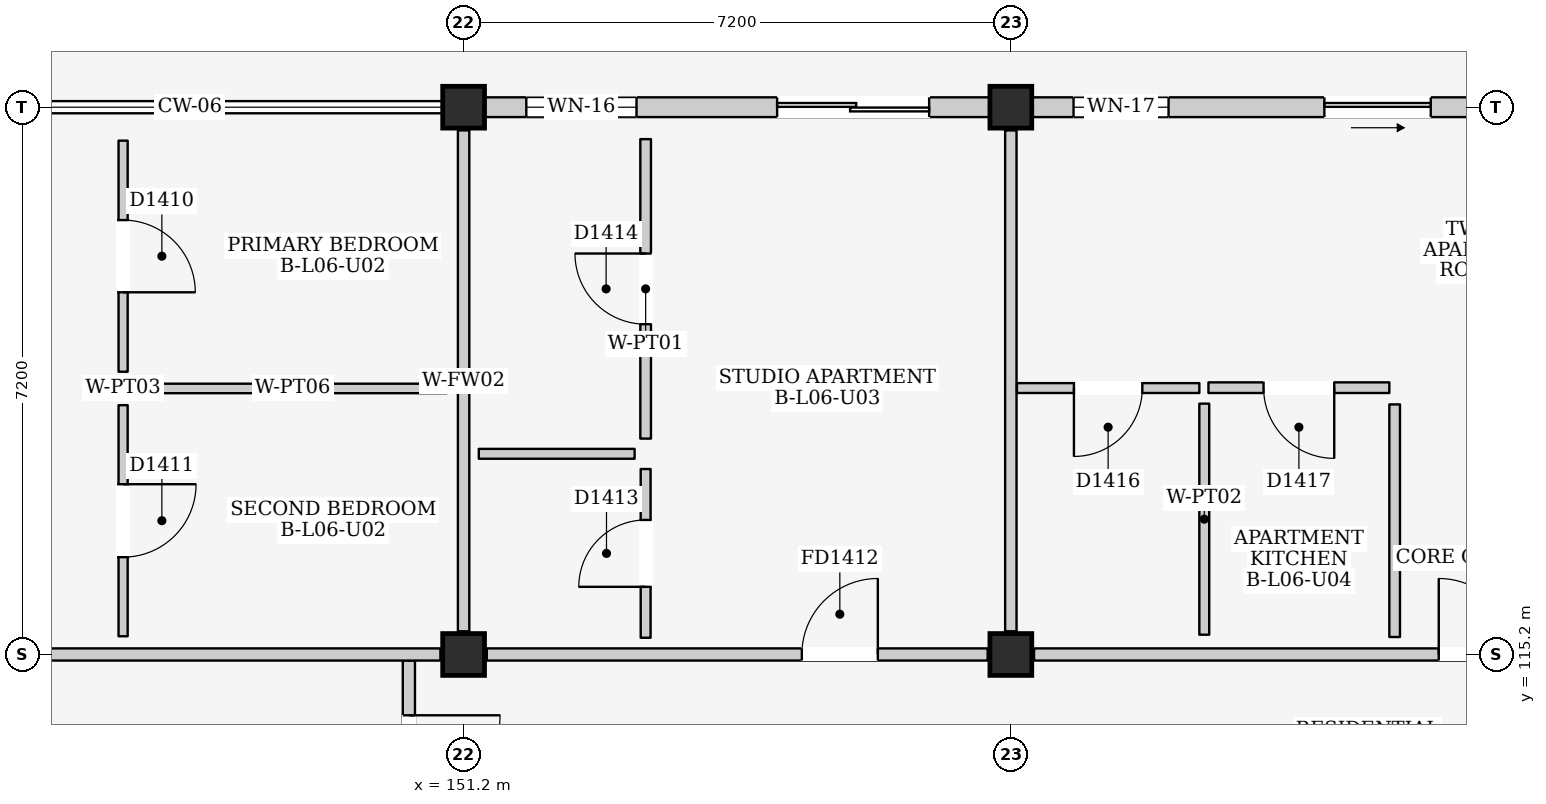
"""IFC4 building model, lengths in metres.
Left out: names, types, materials, properties, quantities, classifications, styles, units other than length and angle.
Written with IfcOpenShell. Run it as: python <this file> out.ifc"""

import sys

from ifc_helpers import new_model, si_unit, direction, frame, frame_2d, origin, origin_2d, place, context, subcontext, project, spatial, rectangle, extrude, element, fill, save


model = new_model("IFC4")
c1 = context("Model", 3, precision=1e-05, world=origin(), true_north=direction((0.0, 1.0)))
c2 = subcontext(c1, "Body", "Model", "MODEL_VIEW")
j1 = project(units=[si_unit("LENGTHUNIT", "METRE"), si_unit("PLANEANGLEUNIT", "RADIAN")], contexts=[c1])
p1 = place(None, origin())
s1 = spatial("IfcSite", under=j1, at=p1, CompositionType="ELEMENT")
p2 = place(p1, origin())
s2 = spatial("IfcBuilding", under=s1, at=p2, CompositionType="ELEMENT")
p3 = place(p2, frame((0.0, 0.0, 21.9)))
s3 = spatial("IfcBuildingStorey", under=s2, at=p3, CompositionType="ELEMENT", Elevation=21.9)
for number, where, z_axis, x_axis in (
    (1, (151.2, 115.2, 0.0), (0.0, 0.0, 1.0), (1.0, 0.0, 0.0)),
    (2, (151.2, 122.4, 0.0), (0.0, 0.0, 1.0), (1.0, 0.0, 0.0)),
    (3, (158.4, 115.2, 0.0), (0.0, 0.0, 1.0), (1.0, 0.0, 0.0)),
    (4, (158.4, 122.4, 0.0), (0.0, 0.0, 1.0), (1.0, 0.0, 0.0)),
):
    element("IfcColumn", number, at=place(p3, frame(where, z_axis=z_axis, x_axis=x_axis)), inside=s3, PredefinedType="COLUMN", context=c2, shape_type="SweptSolid", body=[
        extrude(rectangle(XDim=0.55, YDim=0.55, at=origin_2d()), origin(), (0.0, 0.0, 1.0), 3.2),
    ])
p4 = place(p3, frame((151.475, 122.4, 0.0), z_axis=(0.0, 0.0, 1.0), x_axis=(1.0, 0.0, 0.0)))
e5 = element("IfcWall", 5, at=p4, inside=s3, PredefinedType="ELEMENTEDWALL", context=c2, shape_type="SweptSolid", body=[
    extrude(rectangle(XDim=6.65, YDim=0.26, at=frame_2d((3.325, 0.0))), origin(), (0.0, 0.0, 1.0), 2.515),
])
p5 = place(p4, frame((3.85, 0.0, 0.0)))
e6 = element("IfcOpeningElement", 6, at=p5, cuts=e5, PredefinedType="OPENING", context=c2, shape_type="SweptSolid", body=[
    extrude(rectangle(XDim=2.0, YDim=2.12, at=frame_2d((1.0, 1.06))), frame((0.0, 0.145, 0.0), z_axis=(0.0, -1.0, 0.0), x_axis=(1.0, 0.0, 0.0)), (0.0, 0.0, 1.0), 0.29),
])
p6 = place(p4, frame((0.55, 0.0, 0.9)))
e7 = element("IfcOpeningElement", 7, at=p6, cuts=e5, PredefinedType="OPENING", context=c2, shape_type="SweptSolid", body=[
    extrude(rectangle(XDim=1.45, YDim=1.4, at=frame_2d((0.725, 0.7))), frame((0.0, 0.145, 0.0), z_axis=(0.0, -1.0, 0.0), x_axis=(1.0, 0.0, 0.0)), (0.0, 0.0, 1.0), 0.29),
])
p7 = place(p3, frame((158.675, 122.4, 0.0), z_axis=(0.0, 0.0, 1.0), x_axis=(1.0, 0.0, 0.0)))
e8 = element("IfcWall", 8, at=p7, inside=s3, PredefinedType="ELEMENTEDWALL", context=c2, shape_type="SweptSolid", body=[
    extrude(rectangle(XDim=6.65, YDim=0.26, at=frame_2d((3.325, 0.0))), origin(), (0.0, 0.0, 1.0), 2.515),
])
p8 = place(p7, frame((3.85, 0.0, 0.0)))
e9 = element("IfcOpeningElement", 9, at=p8, cuts=e8, PredefinedType="OPENING", context=c2, shape_type="SweptSolid", body=[
    extrude(rectangle(XDim=1.4, YDim=2.1, at=frame_2d((0.7, 1.05))), frame((0.0, 0.145, 0.0), z_axis=(0.0, -1.0, 0.0), x_axis=(1.0, 0.0, 0.0)), (0.0, 0.0, 1.0), 0.29),
])
p9 = place(p7, frame((0.55, 0.0, 0.9)))
e10 = element("IfcOpeningElement", 10, at=p9, cuts=e8, PredefinedType="OPENING", context=c2, shape_type="SweptSolid", body=[
    extrude(rectangle(XDim=1.25, YDim=1.3, at=frame_2d((0.625, 0.65))), frame((0.0, 0.145, 0.0), z_axis=(0.0, -1.0, 0.0), x_axis=(1.0, 0.0, 0.0)), (0.0, 0.0, 1.0), 0.29),
])
p10 = place(p3, frame((150.48, 111.1, 0.0), z_axis=(0.0, 0.0, 1.0), x_axis=(0.0, 1.0, 0.0)))
e11 = element("IfcWall", 11, at=p10, inside=s3, PredefinedType="PARTITIONING", context=c2, shape_type="SweptSolid", body=[
    extrude(rectangle(XDim=4.02, YDim=0.16, at=frame_2d((2.01, 0.0))), origin(), (0.0, 0.0, 1.0), 2.98),
])
p11 = place(p10, frame((2.1, 0.0, 0.0)))
e12 = element("IfcOpeningElement", 12, at=p11, cuts=e11, PredefinedType="OPENING", context=c2, shape_type="SweptSolid", body=[
    extrude(rectangle(XDim=1.2, YDim=2.2, at=frame_2d((0.6, 1.1))), frame((0.0, 0.095, 0.0), z_axis=(0.0, -1.0, 0.0), x_axis=(1.0, 0.0, 0.0)), (0.0, 0.0, 1.0), 0.19),
])
p12 = place(p3, frame((144.305, 115.2, 0.0), z_axis=(0.0, 0.0, 1.0), x_axis=(1.0, 0.0, 0.0)))
e13 = element("IfcWall", 13, at=p12, inside=s3, PredefinedType="PARTITIONING", context=c2, shape_type="SweptSolid", body=[
    extrude(rectangle(XDim=6.59, YDim=0.16, at=frame_2d((3.295, 0.0))), origin(), (0.0, 0.0, 1.0), 2.365),
])
p13 = place(p3, frame((151.2, 115.505, 0.0), z_axis=(0.0, 0.0, 1.0), x_axis=(0.0, 1.0, 0.0)))
e14 = element("IfcWall", 14, at=p13, inside=s3, PredefinedType="PARTITIONING", context=c2, shape_type="SweptSolid", body=[
    extrude(rectangle(XDim=6.59, YDim=0.15, at=frame_2d((3.295, 0.0))), origin(), (0.0, 0.0, 1.0), 2.465),
])
p14 = place(p3, frame((146.72, 118.92, 0.0), z_axis=(0.0, 0.0, 1.0), x_axis=(0.0, 1.0, 0.0)))
e15 = element("IfcWall", 15, at=p14, inside=s3, PredefinedType="PARTITIONING", context=c2, shape_type="SweptSolid", body=[
    extrude(rectangle(XDim=3.04, YDim=0.12, at=frame_2d((1.52, 0.0))), origin(), (0.0, 0.0, 1.0), 2.98),
])
p15 = place(p14, frame((1.045, 0.0, 0.0)))
e16 = element("IfcOpeningElement", 16, at=p15, cuts=e15, PredefinedType="OPENING", context=c2, shape_type="SweptSolid", body=[
    extrude(rectangle(XDim=0.95, YDim=2.15, at=frame_2d((0.475, 1.075))), frame((0.0, 0.075, 0.0), z_axis=(0.0, -1.0, 0.0), x_axis=(1.0, 0.0, 0.0)), (0.0, 0.0, 1.0), 0.15),
])
p16 = place(p3, frame((146.92, 118.7, 0.0), z_axis=(0.0, 0.0, 1.0), x_axis=(1.0, 0.0, 0.0)))
e17 = element("IfcWall", 17, at=p16, inside=s3, PredefinedType="PARTITIONING", context=c2, shape_type="SweptSolid", body=[
    extrude(rectangle(XDim=4.06, YDim=0.125, at=frame_2d((2.03, 0.0))), origin(), (0.0, 0.0, 1.0), 2.98),
])
p17 = place(p3, frame((146.72, 115.44, 0.0), z_axis=(0.0, 0.0, 1.0), x_axis=(0.0, 1.0, 0.0)))
e18 = element("IfcWall", 18, at=p17, inside=s3, PredefinedType="PARTITIONING", context=c2, shape_type="SweptSolid", body=[
    extrude(rectangle(XDim=3.04, YDim=0.12, at=frame_2d((1.52, 0.0))), origin(), (0.0, 0.0, 1.0), 2.98),
])
p18 = place(p17, frame((1.04, 0.0, 0.0)))
e19 = element("IfcOpeningElement", 19, at=p18, cuts=e18, PredefinedType="OPENING", context=c2, shape_type="SweptSolid", body=[
    extrude(rectangle(XDim=0.96, YDim=2.15, at=frame_2d((0.48, 1.075))), frame((0.0, 0.075, 0.0), z_axis=(0.0, -1.0, 0.0), x_axis=(1.0, 0.0, 0.0)), (0.0, 0.0, 1.0), 0.15),
])
p19 = place(p3, frame((151.505, 115.2, 0.0), z_axis=(0.0, 0.0, 1.0), x_axis=(1.0, 0.0, 0.0)))
e20 = element("IfcWall", 20, at=p19, inside=s3, PredefinedType="PARTITIONING", context=c2, shape_type="SweptSolid", body=[
    extrude(rectangle(XDim=6.59, YDim=0.16, at=frame_2d((3.295, 0.0))), origin(), (0.0, 0.0, 1.0), 2.365),
])
p20 = place(p19, frame((4.145, 0.0, 0.0)))
e21 = element("IfcOpeningElement", 21, at=p20, cuts=e20, PredefinedType="OPENING", context=c2, shape_type="SweptSolid", body=[
    extrude(rectangle(XDim=1.0, YDim=2.15, at=frame_2d((0.5, 1.075))), frame((0.0, 0.095, 0.0), z_axis=(0.0, -1.0, 0.0), x_axis=(1.0, 0.0, 0.0)), (0.0, 0.0, 1.0), 0.19),
])
p21 = place(p3, frame((158.4, 115.505, 0.0), z_axis=(0.0, 0.0, 1.0), x_axis=(0.0, 1.0, 0.0)))
e22 = element("IfcWall", 22, at=p21, inside=s3, PredefinedType="PARTITIONING", context=c2, shape_type="SweptSolid", body=[
    extrude(rectangle(XDim=6.59, YDim=0.15, at=frame_2d((3.295, 0.0))), origin(), (0.0, 0.0, 1.0), 2.465),
])
p22 = place(p3, frame((151.4, 117.84, 0.0), z_axis=(0.0, 0.0, 1.0), x_axis=(1.0, 0.0, 0.0)))
e23 = element("IfcWall", 23, at=p22, inside=s3, PredefinedType="PARTITIONING", context=c2, shape_type="SweptSolid", body=[
    extrude(rectangle(XDim=2.05, YDim=0.13, at=frame_2d((1.025, 0.0))), origin(), (0.0, 0.0, 1.0), 2.98),
])
p23 = place(p3, frame((153.595, 115.42, 0.0), z_axis=(0.0, 0.0, 1.0), x_axis=(0.0, 1.0, 0.0)))
e24 = element("IfcWall", 24, at=p23, inside=s3, PredefinedType="PARTITIONING", context=c2, shape_type="SweptSolid", body=[
    extrude(rectangle(XDim=2.22, YDim=0.13, at=frame_2d((1.11, 0.0))), origin(), (0.0, 0.0, 1.0), 2.98),
])
p24 = place(p23, frame((0.67, 0.0, 0.0)))
e25 = element("IfcOpeningElement", 25, at=p24, cuts=e24, PredefinedType="OPENING", context=c2, shape_type="SweptSolid", body=[
    extrude(rectangle(XDim=0.88, YDim=2.1, at=frame_2d((0.44, 1.05))), frame((0.0, 0.08, 0.0), z_axis=(0.0, -1.0, 0.0), x_axis=(1.0, 0.0, 0.0)), (0.0, 0.0, 1.0), 0.16),
])
p25 = place(p3, frame((153.595, 118.04, 0.0), z_axis=(0.0, 0.0, 1.0), x_axis=(0.0, 1.0, 0.0)))
e26 = element("IfcWall", 26, at=p25, inside=s3, PredefinedType="PARTITIONING", context=c2, shape_type="SweptSolid", body=[
    extrude(rectangle(XDim=3.94, YDim=0.14, at=frame_2d((1.97, 0.0))), origin(), (0.0, 0.0, 1.0), 2.98),
])
p26 = place(p25, frame((1.505, 0.0, 0.0)))
e27 = element("IfcOpeningElement", 27, at=p26, cuts=e26, PredefinedType="OPENING", context=c2, shape_type="SweptSolid", body=[
    extrude(rectangle(XDim=0.93, YDim=2.14, at=frame_2d((0.465, 1.07))), frame((0.0, 0.085, 0.0), z_axis=(0.0, -1.0, 0.0), x_axis=(1.0, 0.0, 0.0)), (0.0, 0.0, 1.0), 0.17),
])
p27 = place(p3, frame((158.705, 115.2, 0.0), z_axis=(0.0, 0.0, 1.0), x_axis=(1.0, 0.0, 0.0)))
e28 = element("IfcWall", 28, at=p27, inside=s3, PredefinedType="PARTITIONING", context=c2, shape_type="SweptSolid", body=[
    extrude(rectangle(XDim=6.59, YDim=0.16, at=frame_2d((3.295, 0.0))), origin(), (0.0, 0.0, 1.0), 2.365),
])
p28 = place(p27, frame((5.325, 0.0, 0.0)))
e29 = element("IfcOpeningElement", 29, at=p28, cuts=e28, PredefinedType="OPENING", context=c2, shape_type="SweptSolid", body=[
    extrude(rectangle(XDim=1.0, YDim=2.15, at=frame_2d((0.5, 1.075))), frame((0.0, 0.095, 0.0), z_axis=(0.0, -1.0, 0.0), x_axis=(1.0, 0.0, 0.0)), (0.0, 0.0, 1.0), 0.19),
])
p29 = place(p3, frame((158.48, 118.705, 0.0), z_axis=(0.0, 0.0, 1.0), x_axis=(1.0, 0.0, 0.0)))
e30 = element("IfcWall", 30, at=p29, inside=s3, PredefinedType="PARTITIONING", context=c2, shape_type="SweptSolid", body=[
    extrude(rectangle(XDim=2.4, YDim=0.13, at=frame_2d((1.2, 0.0))), origin(), (0.0, 0.0, 1.0), 2.98),
])
p30 = place(p29, frame((0.75, 0.0, 0.0)))
e31 = element("IfcOpeningElement", 31, at=p30, cuts=e30, PredefinedType="OPENING", context=c2, shape_type="SweptSolid", body=[
    extrude(rectangle(XDim=0.9, YDim=2.1, at=frame_2d((0.45, 1.05))), frame((0.0, 0.08, 0.0), z_axis=(0.0, -1.0, 0.0), x_axis=(1.0, 0.0, 0.0)), (0.0, 0.0, 1.0), 0.16),
])
p31 = place(p3, frame((160.945, 115.46, 0.0), z_axis=(0.0, 0.0, 1.0), x_axis=(0.0, 1.0, 0.0)))
e32 = element("IfcWall", 32, at=p31, inside=s3, PredefinedType="PARTITIONING", context=c2, shape_type="SweptSolid", body=[
    extrude(rectangle(XDim=3.04, YDim=0.13, at=frame_2d((1.52, 0.0))), origin(), (0.0, 0.0, 1.0), 2.98),
])
p32 = place(p3, frame((161.0, 118.71, 0.0), z_axis=(0.0, 0.0, 1.0), x_axis=(1.0, 0.0, 0.0)))
e33 = element("IfcWall", 33, at=p32, inside=s3, PredefinedType="PARTITIONING", context=c2, shape_type="SweptSolid", body=[
    extrude(rectangle(XDim=2.38, YDim=0.14, at=frame_2d((1.19, 0.0))), origin(), (0.0, 0.0, 1.0), 2.98),
])
p33 = place(p32, frame((0.725, 0.0, 0.0)))
e34 = element("IfcOpeningElement", 34, at=p33, cuts=e33, PredefinedType="OPENING", context=c2, shape_type="SweptSolid", body=[
    extrude(rectangle(XDim=0.93, YDim=2.14, at=frame_2d((0.465, 1.07))), frame((0.0, 0.085, 0.0), z_axis=(0.0, -1.0, 0.0), x_axis=(1.0, 0.0, 0.0)), (0.0, 0.0, 1.0), 0.17),
])
p34 = place(p3, frame((163.45, 115.43, 0.0), z_axis=(0.0, 0.0, 1.0), x_axis=(0.0, 1.0, 0.0)))
e35 = element("IfcWall", 35, at=p34, inside=s3, PredefinedType="PARTITIONING", context=c2, shape_type="SweptSolid", body=[
    extrude(rectangle(XDim=3.06, YDim=0.14, at=frame_2d((1.53, 0.0))), origin(), (0.0, 0.0, 1.0), 2.98),
])
p35 = place(p5, frame((2.0, 0.0, 0.0), z_axis=(0.0, 0.0, 1.0), x_axis=(-1.0, 0.0, 0.0)))
e36 = element("IfcDoor", 36, at=p35, inside=s3, OperationType="DOUBLE_DOOR_SLIDING", PredefinedType="DOOR", context=c2, shape_type="SweptSolid", body=[
    extrude(rectangle(XDim=2.0, YDim=2.12, at=frame_2d((1.0, 1.06))), frame((0.0, 0.025, 0.0), z_axis=(0.0, -1.0, 0.0), x_axis=(1.0, 0.0, 0.0)), (0.0, 0.0, 1.0), 0.05),
])
fill(e6, e36)
p36 = place(p6, origin())
e37 = element("IfcWindow", 37, at=p36, inside=s3, PartitioningType="DOUBLE_PANEL_VERTICAL", PredefinedType="WINDOW", context=c2, shape_type="SweptSolid", body=[
    extrude(rectangle(XDim=1.45, YDim=1.4, at=frame_2d((0.725, 0.7))), frame((0.0, 0.03, 0.0), z_axis=(0.0, -1.0, 0.0), x_axis=(1.0, 0.0, 0.0)), (0.0, 0.0, 1.0), 0.06),
])
fill(e7, e37)
p37 = place(p8, frame((1.4, 0.0, 0.0), z_axis=(0.0, 0.0, 1.0), x_axis=(-1.0, 0.0, 0.0)))
e38 = element("IfcDoor", 38, at=p37, inside=s3, OperationType="SLIDING_TO_RIGHT", PredefinedType="DOOR", context=c2, shape_type="SweptSolid", body=[
    extrude(rectangle(XDim=1.4, YDim=2.1, at=frame_2d((0.7, 1.05))), frame((0.0, 0.025, 0.0), z_axis=(0.0, -1.0, 0.0), x_axis=(1.0, 0.0, 0.0)), (0.0, 0.0, 1.0), 0.05),
])
fill(e9, e38)
p38 = place(p9, origin())
e39 = element("IfcWindow", 39, at=p38, inside=s3, PartitioningType="SINGLE_PANEL", PredefinedType="WINDOW", context=c2, shape_type="SweptSolid", body=[
    extrude(rectangle(XDim=1.25, YDim=1.3, at=frame_2d((0.625, 0.65))), frame((0.0, 0.03, 0.0), z_axis=(0.0, -1.0, 0.0), x_axis=(1.0, 0.0, 0.0)), (0.0, 0.0, 1.0), 0.06),
])
fill(e10, e39)
p39 = place(p11, frame((1.2, 0.0, 0.0), z_axis=(0.0, 0.0, 1.0), x_axis=(-1.0, 0.0, 0.0)))
e40 = element("IfcDoor", 40, at=p39, inside=s3, OperationType="SINGLE_SWING_LEFT", PredefinedType="DOOR", context=c2, shape_type="SweptSolid", body=[
    extrude(rectangle(XDim=1.2, YDim=2.2, at=frame_2d((0.6, 1.1))), frame((0.0, 0.025, 0.0), z_axis=(0.0, -1.0, 0.0), x_axis=(1.0, 0.0, 0.0)), (0.0, 0.0, 1.0), 0.05),
])
fill(e12, e40)
p40 = place(p15, frame((0.95, 0.0, 0.0), z_axis=(0.0, 0.0, 1.0), x_axis=(-1.0, 0.0, 0.0)))
e41 = element("IfcDoor", 41, at=p40, inside=s3, OperationType="SINGLE_SWING_RIGHT", PredefinedType="DOOR", context=c2, shape_type="SweptSolid", body=[
    extrude(rectangle(XDim=0.95, YDim=2.15, at=frame_2d((0.475, 1.075))), frame((0.0, 0.025, 0.0), z_axis=(0.0, -1.0, 0.0), x_axis=(1.0, 0.0, 0.0)), (0.0, 0.0, 1.0), 0.05),
])
fill(e16, e41)
p41 = place(p18, frame((0.96, 0.0, 0.0), z_axis=(0.0, 0.0, 1.0), x_axis=(-1.0, 0.0, 0.0)))
e42 = element("IfcDoor", 42, at=p41, inside=s3, OperationType="SINGLE_SWING_LEFT", PredefinedType="DOOR", context=c2, shape_type="SweptSolid", body=[
    extrude(rectangle(XDim=0.96, YDim=2.15, at=frame_2d((0.48, 1.075))), frame((0.0, 0.025, 0.0), z_axis=(0.0, -1.0, 0.0), x_axis=(1.0, 0.0, 0.0)), (0.0, 0.0, 1.0), 0.05),
])
fill(e19, e42)
p42 = place(p20, origin())
e43 = element("IfcDoor", 43, at=p42, inside=s3, OperationType="SINGLE_SWING_RIGHT", PredefinedType="DOOR", context=c2, shape_type="SweptSolid", body=[
    extrude(rectangle(XDim=1.0, YDim=2.15, at=frame_2d((0.5, 1.075))), frame((0.0, 0.025, 0.0), z_axis=(0.0, -1.0, 0.0), x_axis=(1.0, 0.0, 0.0)), (0.0, 0.0, 1.0), 0.05),
])
fill(e21, e43)
p43 = place(p24, origin())
e44 = element("IfcDoor", 44, at=p43, inside=s3, OperationType="SINGLE_SWING_LEFT", PredefinedType="DOOR", context=c2, shape_type="SweptSolid", body=[
    extrude(rectangle(XDim=0.88, YDim=2.1, at=frame_2d((0.44, 1.05))), frame((0.0, 0.025, 0.0), z_axis=(0.0, -1.0, 0.0), x_axis=(1.0, 0.0, 0.0)), (0.0, 0.0, 1.0), 0.05),
])
fill(e25, e44)
p44 = place(p26, origin())
e45 = element("IfcDoor", 45, at=p44, inside=s3, OperationType="SINGLE_SWING_RIGHT", PredefinedType="DOOR", context=c2, shape_type="SweptSolid", body=[
    extrude(rectangle(XDim=0.93, YDim=2.14, at=frame_2d((0.465, 1.07))), frame((0.0, 0.025, 0.0), z_axis=(0.0, -1.0, 0.0), x_axis=(1.0, 0.0, 0.0)), (0.0, 0.0, 1.0), 0.05),
])
fill(e27, e45)
p45 = place(p28, origin())
e46 = element("IfcDoor", 46, at=p45, inside=s3, OperationType="SINGLE_SWING_LEFT", PredefinedType="DOOR", context=c2, shape_type="SweptSolid", body=[
    extrude(rectangle(XDim=1.0, YDim=2.15, at=frame_2d((0.5, 1.075))), frame((0.0, 0.025, 0.0), z_axis=(0.0, -1.0, 0.0), x_axis=(1.0, 0.0, 0.0)), (0.0, 0.0, 1.0), 0.05),
])
fill(e29, e46)
p46 = place(p30, frame((0.9, 0.0, 0.0), z_axis=(0.0, 0.0, 1.0), x_axis=(-1.0, 0.0, 0.0)))
e47 = element("IfcDoor", 47, at=p46, inside=s3, OperationType="SINGLE_SWING_RIGHT", PredefinedType="DOOR", context=c2, shape_type="SweptSolid", body=[
    extrude(rectangle(XDim=0.9, YDim=2.1, at=frame_2d((0.45, 1.05))), frame((0.0, 0.025, 0.0), z_axis=(0.0, -1.0, 0.0), x_axis=(1.0, 0.0, 0.0)), (0.0, 0.0, 1.0), 0.05),
])
fill(e31, e47)
p47 = place(p33, frame((0.93, 0.0, 0.0), z_axis=(0.0, 0.0, 1.0), x_axis=(-1.0, 0.0, 0.0)))
e48 = element("IfcDoor", 48, at=p47, inside=s3, OperationType="SINGLE_SWING_LEFT", PredefinedType="DOOR", context=c2, shape_type="SweptSolid", body=[
    extrude(rectangle(XDim=0.93, YDim=2.14, at=frame_2d((0.465, 1.07))), frame((0.0, 0.025, 0.0), z_axis=(0.0, -1.0, 0.0), x_axis=(1.0, 0.0, 0.0)), (0.0, 0.0, 1.0), 0.05),
])
fill(e34, e48)
save(model, sys.argv[1])
